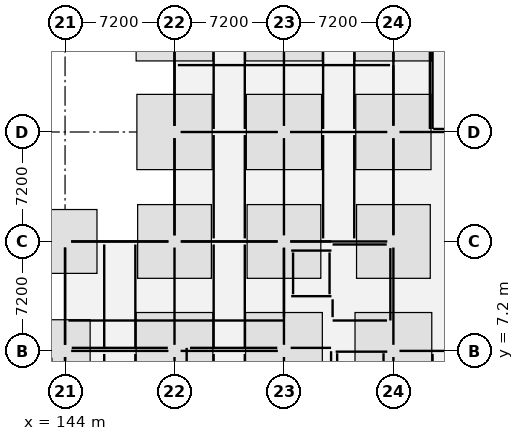
"""IFC4 building model, lengths in metres.
Left out: names, types, materials, properties, quantities, classifications, styles, units other than length and angle.
Written with IfcOpenShell. Run it as: python <this file> out.ifc"""

import sys

from ifc_helpers import new_model, si_unit, direction, frame, frame_2d, origin, origin_2d, place, context, subcontext, project, spatial, rectangle, extrude, element, fill, save


model = new_model("IFC4")
c1 = context("Model", 3, precision=1e-05, world=origin(), true_north=direction((0.0, 1.0)))
c2 = subcontext(c1, "Body", "Model", "MODEL_VIEW")
j1 = project(units=[si_unit("LENGTHUNIT", "METRE"), si_unit("PLANEANGLEUNIT", "RADIAN")], contexts=[c1])
p1 = place(None, origin())
s1 = spatial("IfcSite", under=j1, at=p1, CompositionType="ELEMENT")
p2 = place(p1, origin())
s2 = spatial("IfcBuilding", under=s1, at=p2, CompositionType="ELEMENT")
p3 = place(p2, origin())
s3 = spatial("IfcBuildingStorey", under=s2, at=p3, CompositionType="ELEMENT", Elevation=0.0)
for number, where, z_axis, x_axis in (
    (1, (144.0, 7.2, 0.0), (0.0, 0.0, 1.0), (1.0, 0.0, 0.0)),
    (2, (144.0, 14.4, 0.0), (0.0, 0.0, 1.0), (1.0, 0.0, 0.0)),
    (3, (151.2, 7.2, 0.0), (0.0, 0.0, 1.0), (1.0, 0.0, 0.0)),
    (4, (151.2, 14.4, 0.0), (0.0, 0.0, 1.0), (1.0, 0.0, 0.0)),
    (5, (151.2, 21.6, 0.0), (0.0, 0.0, 1.0), (1.0, 0.0, 0.0)),
    (6, (158.4, 7.2, 0.0), (0.0, 0.0, 1.0), (1.0, 0.0, 0.0)),
    (7, (158.4, 14.4, 0.0), (0.0, 0.0, 1.0), (1.0, 0.0, 0.0)),
    (8, (158.4, 21.6, 0.0), (0.0, 0.0, 1.0), (1.0, 0.0, 0.0)),
    (9, (165.6, 7.2, 0.0), (0.0, 0.0, 1.0), (1.0, 0.0, 0.0)),
    (10, (165.6, 14.4, 0.0), (0.0, 0.0, 1.0), (1.0, 0.0, 0.0)),
    (11, (165.6, 21.6, 0.0), (0.0, 0.0, 1.0), (1.0, 0.0, 0.0)),
):
    element("IfcColumn", number, at=place(p3, frame(where, z_axis=z_axis, x_axis=x_axis)), inside=s3, PredefinedType="COLUMN", context=c2, shape_type="SweptSolid", body=[
        extrude(rectangle(XDim=0.8, YDim=0.8, at=origin_2d()), origin(), (0.0, 0.0, 1.0), 5.4),
    ])
p4 = place(p3, frame((143.1, 7.2, 0.0), z_axis=(0.0, 0.0, 1.0), x_axis=(1.0, 0.0, 0.0)))
e12 = element("IfcColumn", 12, at=p4, inside=s3, PredefinedType="PILASTER", context=c2, shape_type="SweptSolid", body=[
    extrude(rectangle(XDim=0.6, YDim=0.9, at=origin_2d()), origin(), (0.0, 0.0, 1.0), 5.4),
])
for number, where, z_axis, x_axis in (
    (13, (158.875, 10.8, 0.0), (0.0, 0.0, 1.0), (1.0, 0.0, 0.0)),
    (14, (158.875, 13.8, 0.0), (0.0, 0.0, 1.0), (1.0, 0.0, 0.0)),
):
    element("IfcWall", number, at=place(p3, frame(where, z_axis=z_axis, x_axis=x_axis)), inside=s3, PredefinedType="SHEAR", context=c2, shape_type="SweptSolid", body=[
        extrude(rectangle(XDim=2.65, YDim=0.25, at=frame_2d((1.325, 0.0))), origin(), (0.0, 0.0, 1.0), 5.15),
    ])
p5 = place(p3, frame((159.0, 10.925, 0.0), z_axis=(0.0, 0.0, 1.0), x_axis=(0.0, 1.0, 0.0)))
e15 = element("IfcWall", 15, at=p5, inside=s3, PredefinedType="SHEAR", context=c2, shape_type="SweptSolid", body=[
    extrude(rectangle(XDim=2.75, YDim=0.25, at=frame_2d((1.375, 0.0))), origin(), (0.0, 0.0, 1.0), 5.15),
])
p6 = place(p3, frame((161.4, 10.925, 0.0), z_axis=(0.0, 0.0, 1.0), x_axis=(0.0, 1.0, 0.0)))
e16 = element("IfcWall", 16, at=p6, inside=s3, PredefinedType="SHEAR", context=c2, shape_type="SweptSolid", body=[
    extrude(rectangle(XDim=2.75, YDim=0.25, at=frame_2d((1.375, 0.0))), origin(), (0.0, 0.0, 1.0), 5.15),
])
p7 = place(p6, frame((0.825, 0.0, 0.0)))
e17 = element("IfcOpeningElement", 17, at=p7, cuts=e16, PredefinedType="OPENING", context=c2, shape_type="SweptSolid", body=[
    extrude(rectangle(XDim=1.1, YDim=2.15, at=frame_2d((0.55, 1.075))), frame((0.0, 0.137, 0.0), z_axis=(0.0, -1.0, 0.0), x_axis=(1.0, 0.0, 0.0)), (0.0, 0.0, 1.0), 0.274),
])
p8 = place(p3, frame((161.8, 7.15, 0.0), z_axis=(0.0, 0.0, 1.0), x_axis=(1.0, 0.0, 0.0)))
e18 = element("IfcWall", 18, at=p8, inside=s3, PredefinedType="SHEAR", context=c2, shape_type="SweptSolid", body=[
    extrude(rectangle(XDim=3.4, YDim=0.2, at=frame_2d((1.7, 0.0))), origin(), (0.0, 0.0, 1.0), 5.15),
])
p9 = place(p8, frame((1.15, 0.0, 0.0)))
e19 = element("IfcOpeningElement", 19, at=p9, cuts=e18, PredefinedType="OPENING", context=c2, shape_type="SweptSolid", body=[
    extrude(rectangle(XDim=1.1, YDim=2.15, at=frame_2d((0.55, 1.075))), frame((0.0, 0.112, 0.0), z_axis=(0.0, -1.0, 0.0), x_axis=(1.0, 0.0, 0.0)), (0.0, 0.0, 1.0), 0.224),
])
for number, where, z_axis, x_axis in (
    (20, (161.9, 0.43, 0.0), (0.0, 0.0, 1.0), (0.0, 1.0, 0.0)),
    (21, (164.95, 0.43, 0.0), (0.0, 0.0, 1.0), (0.0, 1.0, 0.0)),
):
    element("IfcWall", number, at=place(p3, frame(where, z_axis=z_axis, x_axis=x_axis)), inside=s3, PredefinedType="SHEAR", context=c2, shape_type="SweptSolid", body=[
        extrude(rectangle(XDim=6.62, YDim=0.2, at=frame_2d((3.31, 0.0))), origin(), (0.0, 0.0, 1.0), 5.15),
    ])
p10 = place(p3, frame((144.0, 0.45, 0.0), z_axis=(0.0, 0.0, 1.0), x_axis=(0.0, 1.0, 0.0)))
e22 = element("IfcWall", 22, at=p10, inside=s3, PredefinedType="SOLIDWALL", context=c2, shape_type="SweptSolid", body=[
    extrude(rectangle(XDim=6.35, YDim=0.36, at=frame_2d((3.175, 0.0))), origin(), (0.0, 0.0, 1.0), 4.49),
])
p11 = place(p10, frame((2.175, 0.0, 0.85)))
e23 = element("IfcOpeningElement", 23, at=p11, cuts=e22, PredefinedType="OPENING", context=c2, shape_type="SweptSolid", body=[
    extrude(rectangle(XDim=2.0, YDim=1.85, at=frame_2d((1.0, 0.925))), frame((0.0, 0.192, 0.0), z_axis=(0.0, -1.0, 0.0), x_axis=(1.0, 0.0, 0.0)), (0.0, 0.0, 1.0), 0.384),
])
p12 = place(p3, frame((144.0, 7.6, 0.0), z_axis=(0.0, 0.0, 1.0), x_axis=(0.0, 1.0, 0.0)))
e24 = element("IfcWall", 24, at=p12, inside=s3, PredefinedType="SOLIDWALL", context=c2, shape_type="SweptSolid", body=[
    extrude(rectangle(XDim=6.4, YDim=0.36, at=frame_2d((3.2, 0.0))), origin(), (0.0, 0.0, 1.0), 4.54),
])
p13 = place(p12, frame((2.6, 0.0, 0.85)))
e25 = element("IfcOpeningElement", 25, at=p13, cuts=e24, PredefinedType="OPENING", context=c2, shape_type="SweptSolid", body=[
    extrude(rectangle(XDim=1.2, YDim=2.2, at=frame_2d((0.6, 1.1))), frame((0.0, 0.192, 0.0), z_axis=(0.0, -1.0, 0.0), x_axis=(1.0, 0.0, 0.0)), (0.0, 0.0, 1.0), 0.384),
])
p14 = place(p3, frame((147.4, 14.4, 0.0), z_axis=(0.0, 0.0, 1.0), x_axis=(1.0, 0.0, 0.0)))
e26 = element("IfcWall", 26, at=p14, inside=s3, PredefinedType="SOLIDWALL", context=c2, shape_type="SweptSolid", body=[
    extrude(rectangle(XDim=0.4, YDim=0.36, at=frame_2d((0.2, 0.0))), origin(), (0.0, 0.0, 1.0), 4.39),
])
p15 = place(p3, frame((151.2, 17.8, 0.0), z_axis=(0.0, 0.0, 1.0), x_axis=(0.0, 1.0, 0.0)))
e27 = element("IfcWall", 27, at=p15, inside=s3, PredefinedType="SOLIDWALL", context=c2, shape_type="SweptSolid", body=[
    extrude(rectangle(XDim=0.4, YDim=0.36, at=frame_2d((0.2, 0.0))), origin(), (0.0, 0.0, 1.0), 4.49),
])
p16 = place(p3, frame((151.2, 22.0, 0.0), z_axis=(0.0, 0.0, 1.0), x_axis=(0.0, 1.0, 0.0)))
e28 = element("IfcWall", 28, at=p16, inside=s3, PredefinedType="SOLIDWALL", context=c2, shape_type="SweptSolid", body=[
    extrude(rectangle(XDim=6.4, YDim=0.36, at=frame_2d((3.2, 0.0))), origin(), (0.0, 0.0, 1.0), 4.54),
])
p17 = place(p16, frame((2.75, 0.0, 0.85)))
e29 = element("IfcOpeningElement", 29, at=p17, cuts=e28, PredefinedType="OPENING", context=c2, shape_type="SweptSolid", body=[
    extrude(rectangle(XDim=0.9, YDim=2.0, at=frame_2d((0.45, 1.0))), frame((0.0, 0.192, 0.0), z_axis=(0.0, -1.0, 0.0), x_axis=(1.0, 0.0, 0.0)), (0.0, 0.0, 1.0), 0.384),
])
p18 = place(p3, frame((165.4, 9.2, 0.0), z_axis=(0.0, 0.0, 1.0), x_axis=(0.0, 1.0, 0.0)))
e30 = element("IfcWall", 30, at=p18, inside=s3, PredefinedType="STANDARD", context=c2, shape_type="SweptSolid", body=[
    extrude(rectangle(XDim=4.76, YDim=0.22, at=frame_2d((2.38, 0.0))), origin(), (0.0, 0.0, 1.0), 4.538),
])
p19 = place(p18, frame((1.78, 0.0, 0.0)))
e31 = element("IfcOpeningElement", 31, at=p19, cuts=e30, PredefinedType="OPENING", context=c2, shape_type="SweptSolid", body=[
    extrude(rectangle(XDim=1.2, YDim=2.2, at=frame_2d((0.6, 1.1))), frame((0.0, 0.122, 0.0), z_axis=(0.0, -1.0, 0.0), x_axis=(1.0, 0.0, 0.0)), (0.0, 0.0, 1.0), 0.244),
])
p20 = place(p3, frame((161.6, 9.2, 0.0), z_axis=(0.0, 0.0, 1.0), x_axis=(1.0, 0.0, 0.0)))
e32 = element("IfcWall", 32, at=p20, inside=s3, PredefinedType="STANDARD", context=c2, shape_type="SweptSolid", body=[
    extrude(rectangle(XDim=3.58, YDim=0.22, at=frame_2d((1.79, 0.0))), origin(), (0.0, 0.0, 1.0), 5.12),
])
p21 = place(p3, frame((161.6, 14.2, 0.0), z_axis=(0.0, 0.0, 1.0), x_axis=(1.0, 0.0, 0.0)))
e33 = element("IfcWall", 33, at=p21, inside=s3, PredefinedType="STANDARD", context=c2, shape_type="SweptSolid", body=[
    extrude(rectangle(XDim=3.56, YDim=0.22, at=frame_2d((1.78, 0.0))), origin(), (0.0, 0.0, 1.0), 4.388),
])
p22 = place(p3, frame((161.6, 9.42, 0.0), z_axis=(0.0, 0.0, 1.0), x_axis=(0.0, 1.0, 0.0)))
e34 = element("IfcWall", 34, at=p22, inside=s3, PredefinedType="STANDARD", context=c2, shape_type="SweptSolid", body=[
    extrude(rectangle(XDim=1.174, YDim=0.22, at=frame_2d((0.587, 0.0))), origin(), (0.0, 0.0, 1.0), 5.12),
])
p23 = place(p3, frame((144.44, 7.4, 0.0), z_axis=(0.0, 0.0, 1.0), x_axis=(1.0, 0.0, 0.0)))
e35 = element("IfcWall", 35, at=p23, inside=s3, PredefinedType="STANDARD", context=c2, shape_type="SweptSolid", body=[
    extrude(rectangle(XDim=6.32, YDim=0.22, at=frame_2d((3.16, 0.0))), origin(), (0.0, 0.0, 1.0), 4.438),
])
p24 = place(p23, frame((2.66, 0.0, 0.0)))
e36 = element("IfcOpeningElement", 36, at=p24, cuts=e35, PredefinedType="OPENING", context=c2, shape_type="SweptSolid", body=[
    extrude(rectangle(XDim=1.0, YDim=2.15, at=frame_2d((0.5, 1.075))), frame((0.0, 0.122, 0.0), z_axis=(0.0, -1.0, 0.0), x_axis=(1.0, 0.0, 0.0)), (0.0, 0.0, 1.0), 0.244),
])
p25 = place(p3, frame((152.0, 0.0, 0.0), z_axis=(0.0, 0.0, 1.0), x_axis=(0.0, 1.0, 0.0)))
e37 = element("IfcWall", 37, at=p25, inside=s3, PredefinedType="STANDARD", context=c2, shape_type="SweptSolid", body=[
    extrude(rectangle(XDim=7.4, YDim=0.22, at=frame_2d((3.7, 0.0))), origin(), (0.0, 0.0, 1.0), 4.388),
])
p26 = place(p3, frame((152.22, 7.4, 0.0), z_axis=(0.0, 0.0, 1.0), x_axis=(1.0, 0.0, 0.0)))
e38 = element("IfcWall", 38, at=p26, inside=s3, PredefinedType="PARTITIONING", context=c2, shape_type="SweptSolid", body=[
    extrude(rectangle(XDim=5.74, YDim=0.1, at=frame_2d((2.87, 0.0))), origin(), (0.0, 0.0, 1.0), 4.388),
])
p27 = place(p26, frame((2.37, 0.0, 0.0)))
e39 = element("IfcOpeningElement", 39, at=p27, cuts=e38, PredefinedType="OPENING", context=c2, shape_type="SweptSolid", body=[
    extrude(rectangle(XDim=1.0, YDim=2.15, at=frame_2d((0.5, 1.075))), frame((0.0, 0.062, 0.0), z_axis=(0.0, -1.0, 0.0), x_axis=(1.0, 0.0, 0.0)), (0.0, 0.0, 1.0), 0.124),
])
p28 = place(p3, frame((158.84, 7.4, 0.0), z_axis=(0.0, 0.0, 1.0), x_axis=(1.0, 0.0, 0.0)))
e40 = element("IfcWall", 40, at=p28, inside=s3, PredefinedType="PARTITIONING", context=c2, shape_type="SweptSolid", body=[
    extrude(rectangle(XDim=2.66, YDim=0.1, at=frame_2d((1.33, 0.0))), origin(), (0.0, 0.0, 1.0), 5.12),
])
p29 = place(p3, frame((161.5, 0.22, 0.0), z_axis=(0.0, 0.0, 1.0), x_axis=(0.0, 1.0, 0.0)))
e41 = element("IfcWall", 41, at=p29, inside=s3, PredefinedType="PARTITIONING", context=c2, shape_type="SweptSolid", body=[
    extrude(rectangle(XDim=6.96, YDim=0.1, at=frame_2d((3.48, 0.0))), origin(), (0.0, 0.0, 1.0), 5.12),
])
p30 = place(p3, frame((144.22, 9.2, 0.0), z_axis=(0.0, 0.0, 1.0), x_axis=(1.0, 0.0, 0.0)))
e42 = element("IfcWall", 42, at=p30, inside=s3, PredefinedType="PARTITIONING", context=c2, shape_type="SweptSolid", body=[
    extrude(rectangle(XDim=14.18, YDim=0.12, at=frame_2d((7.09, 0.0))), origin(), (0.0, 0.0, 1.0), 4.488),
])
p31 = place(p30, frame((6.59, 0.0, 0.0)))
e43 = element("IfcOpeningElement", 43, at=p31, cuts=e42, PredefinedType="OPENING", context=c2, shape_type="SweptSolid", body=[
    extrude(rectangle(XDim=1.0, YDim=2.15, at=frame_2d((0.5, 1.075))), frame((0.0, 0.072, 0.0), z_axis=(0.0, -1.0, 0.0), x_axis=(1.0, 0.0, 0.0)), (0.0, 0.0, 1.0), 0.144),
])
p32 = place(p3, frame((158.4, 9.42, 0.0), z_axis=(0.0, 0.0, 1.0), x_axis=(0.0, 1.0, 0.0)))
e44 = element("IfcWall", 44, at=p32, inside=s3, PredefinedType="PARTITIONING", context=c2, shape_type="SweptSolid", body=[
    extrude(rectangle(XDim=4.54, YDim=0.12, at=frame_2d((2.27, 0.0))), origin(), (0.0, 0.0, 1.0), 4.488),
])
p33 = place(p3, frame((168.0, 21.8, 0.0), z_axis=(0.0, 0.0, 1.0), x_axis=(0.0, 1.0, 0.0)))
e45 = element("IfcWall", 45, at=p33, inside=s3, PredefinedType="PARTITIONING", context=c2, shape_type="SweptSolid", body=[
    extrude(rectangle(XDim=15.98, YDim=0.12, at=frame_2d((7.99, 0.0))), origin(), (0.0, 0.0, 1.0), 4.388),
])
p34 = place(p33, frame((7.49, 0.0, 0.0)))
e46 = element("IfcOpeningElement", 46, at=p34, cuts=e45, PredefinedType="OPENING", context=c2, shape_type="SweptSolid", body=[
    extrude(rectangle(XDim=1.0, YDim=2.15, at=frame_2d((0.5, 1.075))), frame((0.0, 0.072, 0.0), z_axis=(0.0, -1.0, 0.0), x_axis=(1.0, 0.0, 0.0)), (0.0, 0.0, 1.0), 0.144),
])
p35 = place(p3, frame((168.22, 21.8, 0.0), z_axis=(0.0, 0.0, 1.0), x_axis=(1.0, 0.0, 0.0)))
e47 = element("IfcWall", 47, at=p35, inside=s3, PredefinedType="PARTITIONING", context=c2, shape_type="SweptSolid", body=[
    extrude(rectangle(XDim=4.14, YDim=0.12, at=frame_2d((2.07, 0.0))), origin(), (0.0, 0.0, 1.0), 4.438),
])
p36 = place(p3, frame((165.6, 14.84, 0.0), z_axis=(0.0, 0.0, 1.0), x_axis=(0.0, 1.0, 0.0)))
e48 = element("IfcWall", 48, at=p36, inside=s3, PredefinedType="PLUMBINGWALL", context=c2, shape_type="SweptSolid", body=[
    extrude(rectangle(XDim=6.32, YDim=0.18, at=frame_2d((3.16, 0.0))), origin(), (0.0, 0.0, 1.0), 4.488),
])
p37 = place(p36, frame((2.71, 0.0, 0.0)))
e49 = element("IfcOpeningElement", 49, at=p37, cuts=e48, PredefinedType="OPENING", context=c2, shape_type="SweptSolid", body=[
    extrude(rectangle(XDim=0.9, YDim=2.1, at=frame_2d((0.45, 1.05))), frame((0.0, 0.102, 0.0), z_axis=(0.0, -1.0, 0.0), x_axis=(1.0, 0.0, 0.0)), (0.0, 0.0, 1.0), 0.204),
])
p38 = place(p3, frame((165.6, 22.04, 0.0), z_axis=(0.0, 0.0, 1.0), x_axis=(0.0, 1.0, 0.0)))
e50 = element("IfcWall", 50, at=p38, inside=s3, PredefinedType="PLUMBINGWALL", context=c2, shape_type="SweptSolid", body=[
    extrude(rectangle(XDim=3.96, YDim=0.18, at=frame_2d((1.98, 0.0))), origin(), (0.0, 0.0, 1.0), 4.538),
])
p39 = place(p3, frame((151.64, 14.4, 0.0), z_axis=(0.0, 0.0, 1.0), x_axis=(1.0, 0.0, 0.0)))
e51 = element("IfcWall", 51, at=p39, inside=s3, PredefinedType="PLUMBINGWALL", context=c2, shape_type="SweptSolid", body=[
    extrude(rectangle(XDim=6.32, YDim=0.18, at=frame_2d((3.16, 0.0))), origin(), (0.0, 0.0, 1.0), 4.438),
])
p40 = place(p3, frame((158.84, 14.4, 0.0), z_axis=(0.0, 0.0, 1.0), x_axis=(1.0, 0.0, 0.0)))
e52 = element("IfcWall", 52, at=p40, inside=s3, PredefinedType="PLUMBINGWALL", context=c2, shape_type="SweptSolid", body=[
    extrude(rectangle(XDim=2.669, YDim=0.18, at=frame_2d((1.334, 0.0))), origin(), (0.0, 0.0, 1.0), 4.388),
])
p41 = place(p3, frame((151.42, 26.0, 0.0), z_axis=(0.0, 0.0, 1.0), x_axis=(1.0, 0.0, 0.0)))
e53 = element("IfcWall", 53, at=p41, inside=s3, PredefinedType="PLUMBINGWALL", context=c2, shape_type="SweptSolid", body=[
    extrude(rectangle(XDim=13.96, YDim=0.18, at=frame_2d((6.98, 0.0))), origin(), (0.0, 0.0, 1.0), 4.488),
])
p42 = place(p3, frame((165.6, 26.22, 0.0), z_axis=(0.0, 0.0, 1.0), x_axis=(0.0, 1.0, 0.0)))
e54 = element("IfcWall", 54, at=p42, inside=s3, PredefinedType="PARTITIONING", context=c2, shape_type="SweptSolid", body=[
    extrude(rectangle(XDim=2.14, YDim=0.1, at=frame_2d((1.07, 0.0))), origin(), (0.0, 0.0, 1.0), 4.538),
])
p43 = place(p42, frame((0.57, 0.0, 0.0)))
e55 = element("IfcOpeningElement", 55, at=p43, cuts=e54, PredefinedType="OPENING", context=c2, shape_type="SweptSolid", body=[
    extrude(rectangle(XDim=1.0, YDim=2.15, at=frame_2d((0.5, 1.075))), frame((0.0, 0.062, 0.0), z_axis=(0.0, -1.0, 0.0), x_axis=(1.0, 0.0, 0.0)), (0.0, 0.0, 1.0), 0.124),
])
p44 = place(p13, origin())
e56 = element("IfcWindow", 56, at=p44, inside=s3, PartitioningType="SINGLE_PANEL", PredefinedType="WINDOW", context=c2, shape_type="SweptSolid", body=[
    extrude(rectangle(XDim=1.2, YDim=2.2, at=frame_2d((0.6, 1.1))), frame((0.0, 0.03, 0.0), z_axis=(0.0, -1.0, 0.0), x_axis=(1.0, 0.0, 0.0)), (0.0, 0.0, 1.0), 0.06),
])
fill(e25, e56)
p45 = place(p17, origin())
e57 = element("IfcWindow", 57, at=p45, inside=s3, PartitioningType="SINGLE_PANEL", PredefinedType="WINDOW", context=c2, shape_type="SweptSolid", body=[
    extrude(rectangle(XDim=0.9, YDim=2.0, at=frame_2d((0.45, 1.0))), frame((0.0, 0.03, 0.0), z_axis=(0.0, -1.0, 0.0), x_axis=(1.0, 0.0, 0.0)), (0.0, 0.0, 1.0), 0.06),
])
fill(e29, e57)
p46 = place(p9, origin())
e58 = element("IfcDoor", 58, at=p46, inside=s3, OperationType="SINGLE_SWING_LEFT", PredefinedType="DOOR", context=c2, shape_type="SweptSolid", body=[
    extrude(rectangle(XDim=1.1, YDim=2.15, at=frame_2d((0.55, 1.075))), frame((0.0, 0.025, 0.0), z_axis=(0.0, -1.0, 0.0), x_axis=(1.0, 0.0, 0.0)), (0.0, 0.0, 1.0), 0.05),
])
fill(e19, e58)
p47 = place(p7, origin())
e59 = element("IfcDoor", 59, at=p47, inside=s3, OperationType="SLIDING_TO_LEFT", PredefinedType="DOOR", context=c2, shape_type="SweptSolid", body=[
    extrude(rectangle(XDim=1.1, YDim=2.15, at=frame_2d((0.55, 1.075))), frame((0.0, 0.025, 0.0), z_axis=(0.0, -1.0, 0.0), x_axis=(1.0, 0.0, 0.0)), (0.0, 0.0, 1.0), 0.05),
])
fill(e17, e59)
p48 = place(p19, origin())
e60 = element("IfcDoor", 60, at=p48, inside=s3, OperationType="SINGLE_SWING_RIGHT", PredefinedType="DOOR", context=c2, shape_type="SweptSolid", body=[
    extrude(rectangle(XDim=1.2, YDim=2.2, at=frame_2d((0.6, 1.1))), frame((0.0, 0.025, 0.0), z_axis=(0.0, -1.0, 0.0), x_axis=(1.0, 0.0, 0.0)), (0.0, 0.0, 1.0), 0.05),
])
fill(e31, e60)
p49 = place(p24, origin())
e61 = element("IfcDoor", 61, at=p49, inside=s3, OperationType="SINGLE_SWING_LEFT", PredefinedType="DOOR", context=c2, shape_type="SweptSolid", body=[
    extrude(rectangle(XDim=1.0, YDim=2.15, at=frame_2d((0.5, 1.075))), frame((0.0, 0.025, 0.0), z_axis=(0.0, -1.0, 0.0), x_axis=(1.0, 0.0, 0.0)), (0.0, 0.0, 1.0), 0.05),
])
fill(e36, e61)
p50 = place(p27, origin())
e62 = element("IfcDoor", 62, at=p50, inside=s3, OperationType="SINGLE_SWING_RIGHT", PredefinedType="DOOR", context=c2, shape_type="SweptSolid", body=[
    extrude(rectangle(XDim=1.0, YDim=2.15, at=frame_2d((0.5, 1.075))), frame((0.0, 0.025, 0.0), z_axis=(0.0, -1.0, 0.0), x_axis=(1.0, 0.0, 0.0)), (0.0, 0.0, 1.0), 0.05),
])
fill(e39, e62)
p51 = place(p31, origin())
e63 = element("IfcDoor", 63, at=p51, inside=s3, OperationType="SINGLE_SWING_LEFT", PredefinedType="DOOR", context=c2, shape_type="SweptSolid", body=[
    extrude(rectangle(XDim=1.0, YDim=2.15, at=frame_2d((0.5, 1.075))), frame((0.0, 0.025, 0.0), z_axis=(0.0, -1.0, 0.0), x_axis=(1.0, 0.0, 0.0)), (0.0, 0.0, 1.0), 0.05),
])
fill(e43, e63)
p52 = place(p37, origin())
e64 = element("IfcDoor", 64, at=p52, inside=s3, OperationType="SINGLE_SWING_LEFT", PredefinedType="DOOR", context=c2, shape_type="SweptSolid", body=[
    extrude(rectangle(XDim=0.9, YDim=2.1, at=frame_2d((0.45, 1.05))), frame((0.0, 0.025, 0.0), z_axis=(0.0, -1.0, 0.0), x_axis=(1.0, 0.0, 0.0)), (0.0, 0.0, 1.0), 0.05),
])
fill(e49, e64)
p53 = place(p43, origin())
e65 = element("IfcDoor", 65, at=p53, inside=s3, OperationType="SINGLE_SWING_RIGHT", PredefinedType="DOOR", context=c2, shape_type="SweptSolid", body=[
    extrude(rectangle(XDim=1.0, YDim=2.15, at=frame_2d((0.5, 1.075))), frame((0.0, 0.025, 0.0), z_axis=(0.0, -1.0, 0.0), x_axis=(1.0, 0.0, 0.0)), (0.0, 0.0, 1.0), 0.05),
])
fill(e55, e65)
save(model, sys.argv[1])
